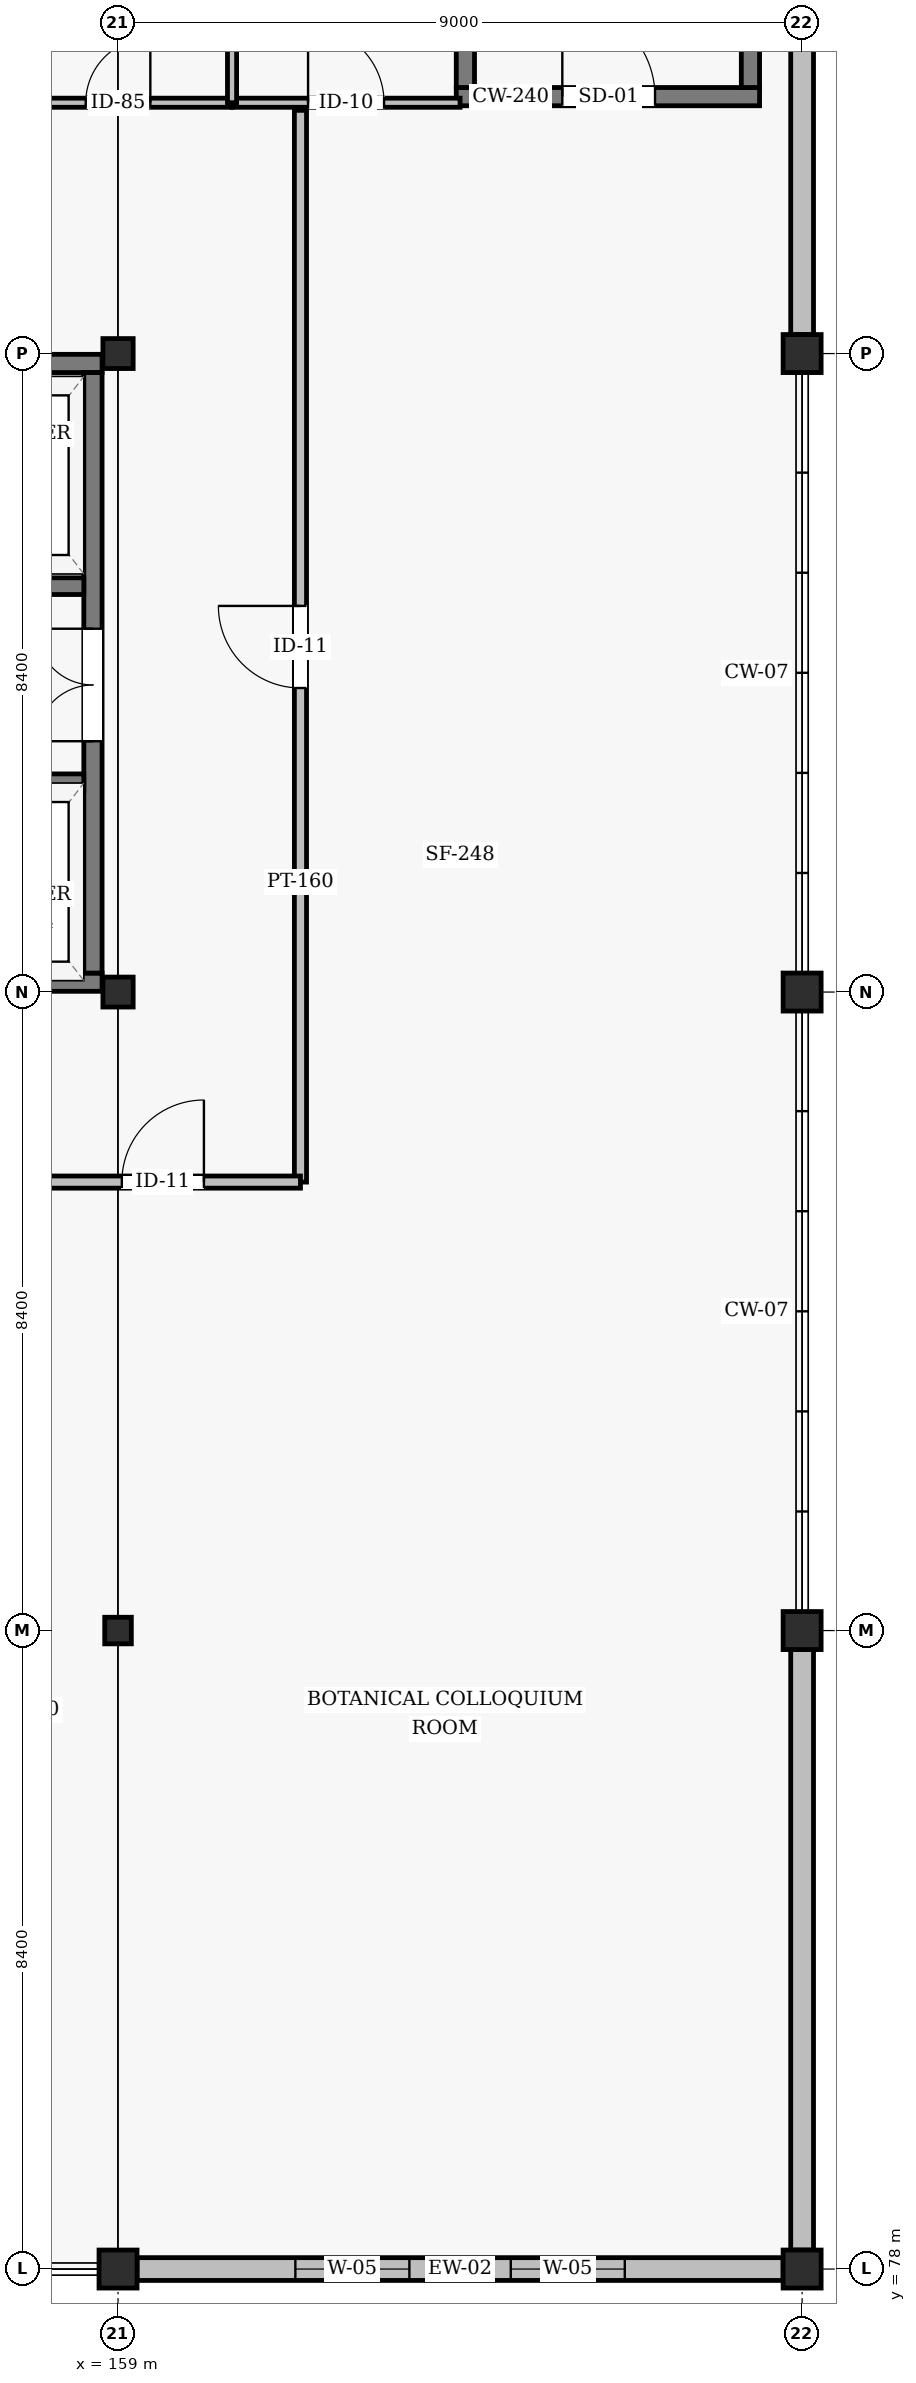
"""IFC4 building model, lengths in metres.
Left out: names, types, materials, properties, quantities, classifications, styles, units other than length and angle.
Written with IfcOpenShell. Run it as: python <this file> out.ifc"""

import sys

from ifc_helpers import new_model, si_unit, direction, frame, frame_2d, origin, origin_2d, place, context, subcontext, project, spatial, rectangle, hollow_rectangle, i_section, extrude, element, fill, save


model = new_model("IFC4")
c1 = context("Model", 3, precision=1e-05, world=origin(), true_north=direction((0.0, 1.0)))
c2 = subcontext(c1, "Body", "Model", "MODEL_VIEW")
j1 = project(units=[si_unit("LENGTHUNIT", "METRE"), si_unit("PLANEANGLEUNIT", "RADIAN")], contexts=[c1])
p1 = place(None, origin())
s1 = spatial("IfcSite", under=j1, at=p1, CompositionType="ELEMENT")
p2 = place(p1, origin())
s2 = spatial("IfcBuilding", under=s1, at=p2, CompositionType="ELEMENT")
p3 = place(p2, frame((0.0, 0.0, 31.8)))
s3 = spatial("IfcBuildingStorey", under=s2, at=p3, CompositionType="ELEMENT", Elevation=31.8)
p4 = place(p3, frame((159.0, 78.0, 0.0), z_axis=(0.0, 0.0, 1.0), x_axis=(1.0, 0.0, 0.0)))
e1 = element("IfcColumn", 1, at=p4, inside=s3, PredefinedType="COLUMN", context=c2, shape_type="SweptSolid", body=[
    extrude(hollow_rectangle(XDim=0.5, YDim=0.5, WallThickness=0.02, InnerFilletRadius=0.02, OuterFilletRadius=0.04, at=origin_2d()), origin(), (0.0, 0.0, 1.0), 3.576),
])
p5 = place(p3, frame((159.0, 86.4, 0.0), z_axis=(0.0, 0.0, 1.0), x_axis=(1.0, 0.0, 0.0)))
e2 = element("IfcColumn", 2, at=p5, inside=s3, PredefinedType="COLUMN", context=c2, shape_type="SweptSolid", body=[
    extrude(i_section(OverallWidth=0.35, OverallDepth=0.35, WebThickness=0.012, FlangeThickness=0.019, FilletRadius=0.02, at=origin_2d()), origin(), (0.0, 0.0, 1.0), 3.6),
])
for number, where, z_axis, x_axis in (
    (3, (159.0, 94.8, 0.0), (0.0, 0.0, 1.0), (1.0, 0.0, 0.0)),
    (4, (159.0, 103.2, 0.0), (0.0, 0.0, 1.0), (1.0, 0.0, 0.0)),
):
    element("IfcColumn", number, at=place(p3, frame(where, z_axis=z_axis, x_axis=x_axis)), inside=s3, PredefinedType="COLUMN", context=c2, shape_type="SweptSolid", body=[
        extrude(i_section(OverallWidth=0.398, OverallDepth=0.394, WebThickness=0.011, FlangeThickness=0.018, FilletRadius=0.022, at=origin_2d()), origin(), (0.0, 0.0, 1.0), 3.6),
    ])
p6 = place(p3, frame((168.0, 78.0, 0.0), z_axis=(0.0, 0.0, 1.0), x_axis=(1.0, 0.0, 0.0)))
e5 = element("IfcColumn", 5, at=p6, inside=s3, PredefinedType="COLUMN", context=c2, shape_type="SweptSolid", body=[
    extrude(hollow_rectangle(XDim=0.5, YDim=0.5, WallThickness=0.02, InnerFilletRadius=0.02, OuterFilletRadius=0.04, at=origin_2d()), origin(), (0.0, 0.0, 1.0), 3.576),
])
for number, where, z_axis, x_axis in (
    (6, (168.0, 86.4, 0.0), (0.0, 0.0, 1.0), (1.0, 0.0, 0.0)),
    (7, (168.0, 94.8, 0.0), (0.0, 0.0, 1.0), (1.0, 0.0, 0.0)),
    (8, (168.0, 103.2, 0.0), (0.0, 0.0, 1.0), (1.0, 0.0, 0.0)),
):
    element("IfcColumn", number, at=place(p3, frame(where, z_axis=z_axis, x_axis=x_axis)), inside=s3, PredefinedType="COLUMN", context=c2, shape_type="SweptSolid", body=[
        extrude(hollow_rectangle(XDim=0.5, YDim=0.5, WallThickness=0.02, InnerFilletRadius=0.02, OuterFilletRadius=0.04, at=origin_2d()), origin(), (0.0, 0.0, 1.0), 3.6),
    ])
p7 = place(p3, frame((159.25, 78.0, 0.0), z_axis=(0.0, 0.0, 1.0), x_axis=(1.0, 0.0, 0.0)))
e9 = element("IfcWall", 9, at=p7, inside=s3, PredefinedType="SOLIDWALL", context=c2, shape_type="SweptSolid", body=[
    extrude(rectangle(XDim=8.5, YDim=0.3, at=frame_2d((4.25, 0.0))), origin(), (0.0, 0.0, 1.0), 3.295),
])
p8 = place(p7, frame((2.083, 0.0, 0.85)))
e10 = element("IfcOpeningElement", 10, at=p8, cuts=e9, PredefinedType="OPENING", context=c2, shape_type="SweptSolid", body=[
    extrude(rectangle(XDim=1.5, YDim=2.1, at=frame_2d((0.75, 1.05))), frame((0.0, 0.16, 0.0), z_axis=(0.0, -1.0, 0.0), x_axis=(1.0, 0.0, 0.0)), (0.0, 0.0, 1.0), 0.32),
])
p9 = place(p7, frame((4.917, 0.0, 0.85)))
e11 = element("IfcOpeningElement", 11, at=p9, cuts=e9, PredefinedType="OPENING", context=c2, shape_type="SweptSolid", body=[
    extrude(rectangle(XDim=1.5, YDim=2.1, at=frame_2d((0.75, 1.05))), frame((0.0, 0.16, 0.0), z_axis=(0.0, -1.0, 0.0), x_axis=(1.0, 0.0, 0.0)), (0.0, 0.0, 1.0), 0.32),
])
p10 = place(p3, frame((168.0, 78.25, 0.0), z_axis=(0.0, 0.0, 1.0), x_axis=(0.0, 1.0, 0.0)))
e12 = element("IfcWall", 12, at=p10, inside=s3, PredefinedType="SOLIDWALL", context=c2, shape_type="SweptSolid", body=[
    extrude(rectangle(XDim=7.9, YDim=0.3, at=frame_2d((3.95, 0.0))), origin(), (0.0, 0.0, 1.0), 2.095),
])
p11 = place(p3, frame((168.0, 103.45, 0.0), z_axis=(0.0, 0.0, 1.0), x_axis=(0.0, 1.0, 0.0)))
e13 = element("IfcWall", 13, at=p11, inside=s3, PredefinedType="SOLIDWALL", context=c2, shape_type="SweptSolid", body=[
    extrude(rectangle(XDim=11.5, YDim=0.3, at=frame_2d((5.75, 0.0))), origin(), (0.0, 0.0, 1.0), 2.503),
])
p12 = place(p3, frame((150.02, 94.93, 0.0), z_axis=(0.0, 0.0, 1.0), x_axis=(1.0, 0.0, 0.0)))
e14 = element("IfcWall", 14, at=p12, inside=s3, PredefinedType="SHEAR", context=c2, shape_type="SweptSolid", body=[
    extrude(rectangle(XDim=8.77, YDim=0.24, at=frame_2d((4.385, 0.0))), origin(), (0.0, 0.0, 1.0), 3.295),
])
p13 = place(p12, frame((1.79, 0.0, 0.0)))
e15 = element("IfcOpeningElement", 15, at=p13, cuts=e14, PredefinedType="OPENING", context=c2, shape_type="SweptSolid", body=[
    extrude(rectangle(XDim=1.22, YDim=2.18, at=frame_2d((0.61, 1.09))), frame((0.0, 0.13, 0.0), z_axis=(0.0, -1.0, 0.0), x_axis=(1.0, 0.0, 0.0)), (0.0, 0.0, 1.0), 0.26),
])
p14 = place(p3, frame((150.02, 103.07, 0.0), z_axis=(0.0, 0.0, 1.0), x_axis=(1.0, 0.0, 0.0)))
e16 = element("IfcWall", 16, at=p14, inside=s3, PredefinedType="SHEAR", context=c2, shape_type="SweptSolid", body=[
    extrude(rectangle(XDim=8.77, YDim=0.24, at=frame_2d((4.385, 0.0))), origin(), (0.0, 0.0, 1.0), 3.295),
])
p15 = place(p3, frame((158.67, 95.05, 0.0), z_axis=(0.0, 0.0, 1.0), x_axis=(0.0, 1.0, 0.0)))
e17 = element("IfcWall", 17, at=p15, inside=s3, PredefinedType="SHEAR", context=c2, shape_type="SweptSolid", body=[
    extrude(rectangle(XDim=7.9, YDim=0.24, at=frame_2d((3.95, 0.0))), origin(), (0.0, 0.0, 1.0), 3.295),
])
p16 = place(p15, frame((3.05, 0.0, 0.0)))
e18 = element("IfcOpeningElement", 18, at=p16, cuts=e17, PredefinedType="OPENING", context=c2, shape_type="SweptSolid", body=[
    extrude(rectangle(XDim=1.48, YDim=2.22, at=frame_2d((0.74, 1.11))), frame((0.0, 0.13, 0.0), z_axis=(0.0, -1.0, 0.0), x_axis=(1.0, 0.0, 0.0)), (0.0, 0.0, 1.0), 0.26),
])
p17 = place(p3, frame((156.55, 100.14, 0.0), z_axis=(0.0, 0.0, 1.0), x_axis=(1.0, 0.0, 0.0)))
e19 = element("IfcWall", 19, at=p17, inside=s3, PredefinedType="SHEAR", context=c2, shape_type="SweptSolid", body=[
    extrude(rectangle(XDim=2.0, YDim=0.22, at=frame_2d((1.0, 0.0))), origin(), (0.0, 0.0, 1.0), 3.295),
])
p18 = place(p17, frame((0.45, 0.0, 0.0)))
e20 = element("IfcOpeningElement", 20, at=p18, cuts=e19, PredefinedType="OPENING", context=c2, shape_type="SweptSolid", body=[
    extrude(rectangle(XDim=1.1, YDim=2.15, at=frame_2d((0.55, 1.075))), frame((0.0, 0.12, 0.0), z_axis=(0.0, -1.0, 0.0), x_axis=(1.0, 0.0, 0.0)), (0.0, 0.0, 1.0), 0.24),
])
p19 = place(p3, frame((156.55, 97.56, 0.0), z_axis=(0.0, 0.0, 1.0), x_axis=(1.0, 0.0, 0.0)))
e21 = element("IfcWall", 21, at=p19, inside=s3, PredefinedType="SHEAR", context=c2, shape_type="SweptSolid", body=[
    extrude(rectangle(XDim=2.0, YDim=0.22, at=frame_2d((1.0, 0.0))), origin(), (0.0, 0.0, 1.0), 3.295),
])
p20 = place(p19, frame((0.45, 0.0, 0.0)))
e22 = element("IfcOpeningElement", 22, at=p20, cuts=e21, PredefinedType="OPENING", context=c2, shape_type="SweptSolid", body=[
    extrude(rectangle(XDim=1.1, YDim=2.15, at=frame_2d((0.55, 1.075))), frame((0.0, 0.12, 0.0), z_axis=(0.0, -1.0, 0.0), x_axis=(1.0, 0.0, 0.0)), (0.0, 0.0, 1.0), 0.24),
])
p21 = place(p3, frame((163.45, 106.58, 0.0), z_axis=(0.0, 0.0, 1.0), x_axis=(1.0, 0.0, 0.0)))
e23 = element("IfcWall", 23, at=p21, inside=s3, PredefinedType="SHEAR", context=c2, shape_type="SweptSolid", body=[
    extrude(rectangle(XDim=3.99, YDim=0.24, at=frame_2d((1.995, 0.0))), origin(), (0.0, 0.0, 1.0), 3.295),
])
p22 = place(p21, frame((1.395, 0.0, 0.0)))
e24 = element("IfcOpeningElement", 24, at=p22, cuts=e23, PredefinedType="OPENING", context=c2, shape_type="SweptSolid", body=[
    extrude(rectangle(XDim=1.22, YDim=2.18, at=frame_2d((0.61, 1.09))), frame((0.0, 0.13, 0.0), z_axis=(0.0, -1.0, 0.0), x_axis=(1.0, 0.0, 0.0)), (0.0, 0.0, 1.0), 0.26),
])
for number, where, z_axis, x_axis in (
    (25, (163.57, 106.7, 0.0), (0.0, 0.0, 1.0), (0.0, 1.0, 0.0)),
    (26, (167.32, 106.7, 0.0), (0.0, 0.0, 1.0), (0.0, 1.0, 0.0)),
):
    element("IfcWall", number, at=place(p3, frame(where, z_axis=z_axis, x_axis=x_axis)), inside=s3, PredefinedType="SHEAR", context=c2, shape_type="SweptSolid", body=[
        extrude(rectangle(XDim=7.9, YDim=0.24, at=frame_2d((3.95, 0.0))), origin(), (0.0, 0.0, 1.0), 3.295),
    ])
p23 = place(p3, frame((157.5, 106.5, 0.0), z_axis=(0.0, 0.0, 1.0), x_axis=(1.0, 0.0, 0.0)))
e27 = element("IfcWall", 27, at=p23, inside=s3, PredefinedType="PARTITIONING", context=c2, shape_type="SweptSolid", body=[
    extrude(rectangle(XDim=3.0, YDim=0.12, at=frame_2d((1.5, 0.0))), origin(), (0.0, 0.0, 1.0), 2.545),
])
p24 = place(p23, frame((1.075, 0.0, 0.0)))
e28 = element("IfcOpeningElement", 28, at=p24, cuts=e27, PredefinedType="OPENING", context=c2, shape_type="SweptSolid", body=[
    extrude(rectangle(XDim=0.85, YDim=2.1, at=frame_2d((0.425, 1.05))), frame((0.0, 0.07, 0.0), z_axis=(0.0, -1.0, 0.0), x_axis=(1.0, 0.0, 0.0)), (0.0, 0.0, 1.0), 0.14),
])
p25 = place(p3, frame((160.5, 106.5, 0.0), z_axis=(0.0, 0.0, 1.0), x_axis=(1.0, 0.0, 0.0)))
e29 = element("IfcWall", 29, at=p25, inside=s3, PredefinedType="PARTITIONING", context=c2, shape_type="SweptSolid", body=[
    extrude(rectangle(XDim=3.0, YDim=0.12, at=frame_2d((1.5, 0.0))), origin(), (0.0, 0.0, 1.0), 3.295),
])
p26 = place(p25, frame((1.0, 0.0, 0.0)))
e30 = element("IfcOpeningElement", 30, at=p26, cuts=e29, PredefinedType="OPENING", context=c2, shape_type="SweptSolid", body=[
    extrude(rectangle(XDim=1.0, YDim=2.1, at=frame_2d((0.5, 1.05))), frame((0.0, 0.07, 0.0), z_axis=(0.0, -1.0, 0.0), x_axis=(1.0, 0.0, 0.0)), (0.0, 0.0, 1.0), 0.14),
])
p27 = place(p3, frame((160.5, 106.5, 0.0), z_axis=(0.0, 0.0, 1.0), x_axis=(0.0, 1.0, 0.0)))
e31 = element("IfcWall", 31, at=p27, inside=s3, PredefinedType="PARTITIONING", context=c2, shape_type="SweptSolid", body=[
    extrude(rectangle(XDim=8.3, YDim=0.12, at=frame_2d((4.15, 0.0))), origin(), (0.0, 0.0, 1.0), 3.295),
])
p28 = place(p3, frame((161.4, 92.3, 0.0), z_axis=(0.0, 0.0, 1.0), x_axis=(0.0, 1.0, 0.0)))
e32 = element("IfcWall", 32, at=p28, inside=s3, PredefinedType="PARTITIONING", context=c2, shape_type="SweptSolid", body=[
    extrude(rectangle(XDim=14.1, YDim=0.16, at=frame_2d((7.05, 0.0))), origin(), (0.0, 0.0, 1.0), 2.695),
])
p29 = place(p28, frame((6.5, 0.0, 0.0)))
e33 = element("IfcOpeningElement", 33, at=p29, cuts=e32, PredefinedType="OPENING", context=c2, shape_type="SweptSolid", body=[
    extrude(rectangle(XDim=1.08, YDim=2.08, at=frame_2d((0.54, 1.04))), frame((0.0, 0.09, 0.0), z_axis=(0.0, -1.0, 0.0), x_axis=(1.0, 0.0, 0.0)), (0.0, 0.0, 1.0), 0.18),
])
p30 = place(p3, frame((157.8, 92.3, 0.0), z_axis=(0.0, 0.0, 1.0), x_axis=(1.0, 0.0, 0.0)))
e34 = element("IfcWall", 34, at=p30, inside=s3, PredefinedType="PARTITIONING", context=c2, shape_type="SweptSolid", body=[
    extrude(rectangle(XDim=3.6, YDim=0.16, at=frame_2d((1.8, 0.0))), origin(), (0.0, 0.0, 1.0), 2.795),
])
p31 = place(p30, frame((1.25, 0.0, 0.0)))
e35 = element("IfcOpeningElement", 35, at=p31, cuts=e34, PredefinedType="OPENING", context=c2, shape_type="SweptSolid", body=[
    extrude(rectangle(XDim=1.08, YDim=2.08, at=frame_2d((0.54, 1.04))), frame((0.0, 0.09, 0.0), z_axis=(0.0, -1.0, 0.0), x_axis=(1.0, 0.0, 0.0)), (0.0, 0.0, 1.0), 0.18),
])
p32 = place(p8, origin())
e36 = element("IfcWindow", 36, at=p32, inside=s3, PartitioningType="SINGLE_PANEL", PredefinedType="WINDOW", context=c2, shape_type="SweptSolid", body=[
    extrude(rectangle(XDim=1.5, YDim=2.1, at=frame_2d((0.75, 1.05))), frame((0.0, 0.03, 0.0), z_axis=(0.0, -1.0, 0.0), x_axis=(1.0, 0.0, 0.0)), (0.0, 0.0, 1.0), 0.06),
])
fill(e10, e36)
p33 = place(p9, origin())
e37 = element("IfcWindow", 37, at=p33, inside=s3, PartitioningType="SINGLE_PANEL", PredefinedType="WINDOW", context=c2, shape_type="SweptSolid", body=[
    extrude(rectangle(XDim=1.5, YDim=2.1, at=frame_2d((0.75, 1.05))), frame((0.0, 0.03, 0.0), z_axis=(0.0, -1.0, 0.0), x_axis=(1.0, 0.0, 0.0)), (0.0, 0.0, 1.0), 0.06),
])
fill(e11, e37)
p34 = place(p16, origin())
e38 = element("IfcDoor", 38, at=p34, inside=s3, OperationType="DOUBLE_DOOR_SINGLE_SWING", PredefinedType="DOOR", context=c2, shape_type="SweptSolid", body=[
    extrude(rectangle(XDim=1.48, YDim=2.22, at=frame_2d((0.74, 1.11))), frame((0.0, 0.025, 0.0), z_axis=(0.0, -1.0, 0.0), x_axis=(1.0, 0.0, 0.0)), (0.0, 0.0, 1.0), 0.05),
])
fill(e18, e38)
p35 = place(p22, origin())
e39 = element("IfcDoor", 39, at=p35, inside=s3, OperationType="SINGLE_SWING_LEFT", PredefinedType="DOOR", context=c2, shape_type="SweptSolid", body=[
    extrude(rectangle(XDim=1.22, YDim=2.18, at=frame_2d((0.61, 1.09))), frame((0.0, 0.025, 0.0), z_axis=(0.0, -1.0, 0.0), x_axis=(1.0, 0.0, 0.0)), (0.0, 0.0, 1.0), 0.05),
])
fill(e24, e39)
p36 = place(p24, origin())
e40 = element("IfcDoor", 40, at=p36, inside=s3, OperationType="SINGLE_SWING_RIGHT", PredefinedType="DOOR", context=c2, shape_type="SweptSolid", body=[
    extrude(rectangle(XDim=0.85, YDim=2.1, at=frame_2d((0.425, 1.05))), frame((0.0, 0.025, 0.0), z_axis=(0.0, -1.0, 0.0), x_axis=(1.0, 0.0, 0.0)), (0.0, 0.0, 1.0), 0.05),
])
fill(e28, e40)
p37 = place(p26, origin())
e41 = element("IfcDoor", 41, at=p37, inside=s3, OperationType="SINGLE_SWING_LEFT", PredefinedType="DOOR", context=c2, shape_type="SweptSolid", body=[
    extrude(rectangle(XDim=1.0, YDim=2.1, at=frame_2d((0.5, 1.05))), frame((0.0, 0.025, 0.0), z_axis=(0.0, -1.0, 0.0), x_axis=(1.0, 0.0, 0.0)), (0.0, 0.0, 1.0), 0.05),
])
fill(e30, e41)
p38 = place(p29, origin())
e42 = element("IfcDoor", 42, at=p38, inside=s3, OperationType="SINGLE_SWING_RIGHT", PredefinedType="DOOR", context=c2, shape_type="SweptSolid", body=[
    extrude(rectangle(XDim=1.08, YDim=2.08, at=frame_2d((0.54, 1.04))), frame((0.0, 0.025, 0.0), z_axis=(0.0, -1.0, 0.0), x_axis=(1.0, 0.0, 0.0)), (0.0, 0.0, 1.0), 0.05),
])
fill(e33, e42)
p39 = place(p31, origin())
e43 = element("IfcDoor", 43, at=p39, inside=s3, OperationType="SINGLE_SWING_RIGHT", PredefinedType="DOOR", context=c2, shape_type="SweptSolid", body=[
    extrude(rectangle(XDim=1.08, YDim=2.08, at=frame_2d((0.54, 1.04))), frame((0.0, 0.025, 0.0), z_axis=(0.0, -1.0, 0.0), x_axis=(1.0, 0.0, 0.0)), (0.0, 0.0, 1.0), 0.05),
])
fill(e35, e43)
save(model, sys.argv[1])
